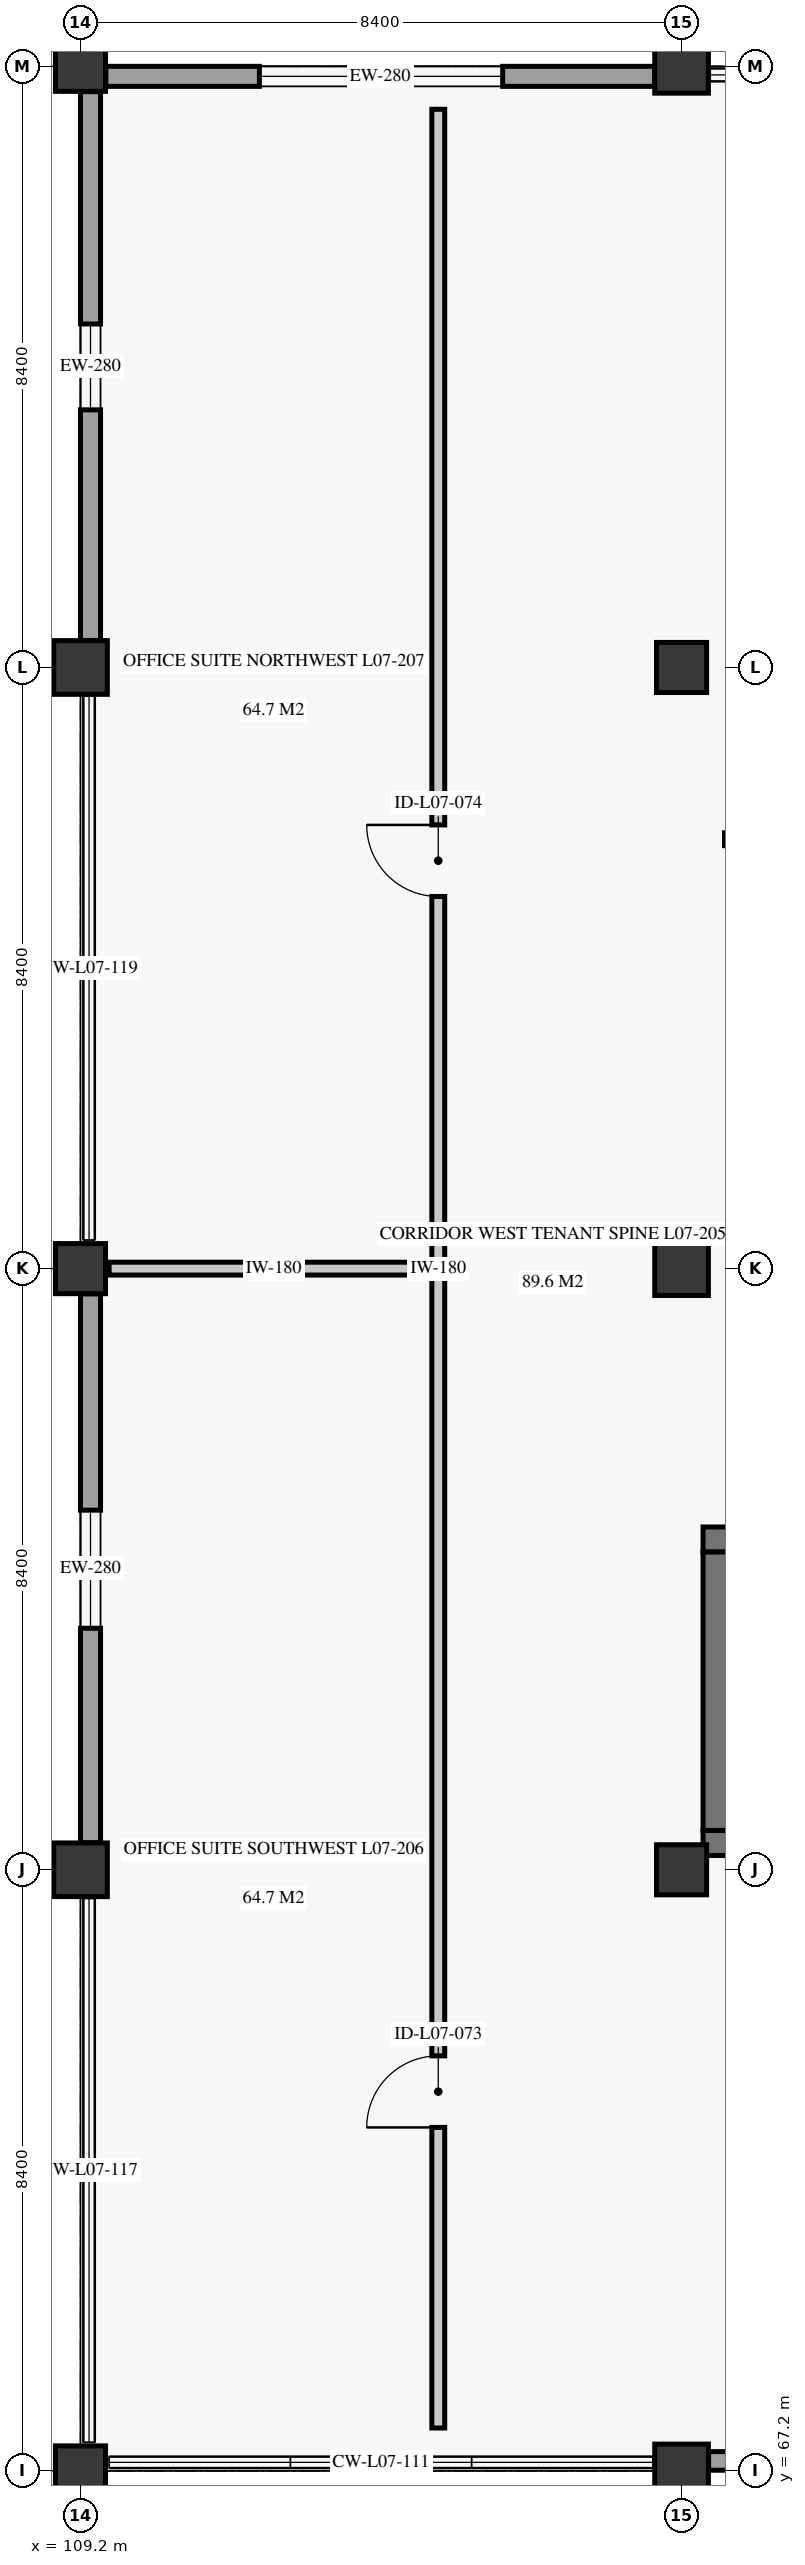
"""IFC4 building model, lengths in metres.
Left out: names, types, materials, properties, quantities, classifications, styles, units other than length and angle.
Written with IfcOpenShell. Run it as: python <this file> out.ifc"""

import sys

from ifc_helpers import new_model, si_unit, direction, frame, frame_2d, origin, origin_2d, place, context, subcontext, project, spatial, rectangle, extrude, element, fill, save


model = new_model("IFC4")
c1 = context("Model", 3, precision=1e-05, world=origin(), true_north=direction((0.0, 1.0)))
c2 = subcontext(c1, "Body", "Model", "MODEL_VIEW")
j1 = project(units=[si_unit("LENGTHUNIT", "METRE"), si_unit("PLANEANGLEUNIT", "RADIAN")], contexts=[c1])
p1 = place(None, origin())
s1 = spatial("IfcSite", under=j1, at=p1, CompositionType="ELEMENT")
p2 = place(p1, origin())
s2 = spatial("IfcBuilding", under=s1, at=p2, CompositionType="ELEMENT")
p3 = place(p2, frame((0.0, 0.0, 30.7)))
s3 = spatial("IfcBuildingStorey", under=s2, at=p3, CompositionType="ELEMENT", Elevation=30.7)
p4 = place(p3, frame((109.2, 67.2, 0.0), z_axis=(0.0, 0.0, 1.0), x_axis=(1.0, 0.0, 0.0)))
e1 = element("IfcColumn", 1, at=p4, inside=s3, PredefinedType="COLUMN", context=c2, shape_type="SweptSolid", body=[
    extrude(rectangle(XDim=0.7, YDim=0.7, at=origin_2d()), origin(), (0.0, 0.0, 1.0), 3.72),
])
p5 = place(p3, frame((109.2, 75.6, 0.0), z_axis=(0.0, 0.0, 1.0), x_axis=(1.0, 0.0, 0.0)))
e2 = element("IfcColumn", 2, at=p5, inside=s3, PredefinedType="COLUMN", context=c2, shape_type="SweptSolid", body=[
    extrude(rectangle(XDim=0.75, YDim=0.75, at=origin_2d()), origin(), (0.0, 0.0, 1.0), 3.72),
])
p6 = place(p3, frame((109.2, 84.0, 0.0), z_axis=(0.0, 0.0, 1.0), x_axis=(1.0, 0.0, 0.0)))
e3 = element("IfcColumn", 3, at=p6, inside=s3, PredefinedType="COLUMN", context=c2, shape_type="SweptSolid", body=[
    extrude(rectangle(XDim=0.7, YDim=0.7, at=origin_2d()), origin(), (0.0, 0.0, 1.0), 3.72),
])
p7 = place(p3, frame((109.2, 92.4, 0.0), z_axis=(0.0, 0.0, 1.0), x_axis=(1.0, 0.0, 0.0)))
e4 = element("IfcColumn", 4, at=p7, inside=s3, PredefinedType="COLUMN", context=c2, shape_type="SweptSolid", body=[
    extrude(rectangle(XDim=0.75, YDim=0.75, at=origin_2d()), origin(), (0.0, 0.0, 1.0), 3.72),
])
p8 = place(p3, frame((109.2, 100.8, 0.0), z_axis=(0.0, 0.0, 1.0), x_axis=(1.0, 0.0, 0.0)))
e5 = element("IfcColumn", 5, at=p8, inside=s3, PredefinedType="COLUMN", context=c2, shape_type="SweptSolid", body=[
    extrude(rectangle(XDim=0.7, YDim=0.7, at=origin_2d()), origin(), (0.0, 0.0, 1.0), 3.72),
])
p9 = place(p3, frame((117.6, 67.2, 0.0), z_axis=(0.0, 0.0, 1.0), x_axis=(1.0, 0.0, 0.0)))
e6 = element("IfcColumn", 6, at=p9, inside=s3, PredefinedType="COLUMN", context=c2, shape_type="SweptSolid", body=[
    extrude(rectangle(XDim=0.75, YDim=0.75, at=origin_2d()), origin(), (0.0, 0.0, 1.0), 3.72),
])
p10 = place(p3, frame((117.6, 75.6, 0.0), z_axis=(0.0, 0.0, 1.0), x_axis=(1.0, 0.0, 0.0)))
e7 = element("IfcColumn", 7, at=p10, inside=s3, PredefinedType="COLUMN", context=c2, shape_type="SweptSolid", body=[
    extrude(rectangle(XDim=0.7, YDim=0.7, at=origin_2d()), origin(), (0.0, 0.0, 1.0), 3.72),
])
p11 = place(p3, frame((117.6, 84.0, 0.0), z_axis=(0.0, 0.0, 1.0), x_axis=(1.0, 0.0, 0.0)))
e8 = element("IfcColumn", 8, at=p11, inside=s3, PredefinedType="COLUMN", context=c2, shape_type="SweptSolid", body=[
    extrude(rectangle(XDim=0.75, YDim=0.75, at=origin_2d()), origin(), (0.0, 0.0, 1.0), 3.72),
])
p12 = place(p3, frame((117.6, 92.4, 0.0), z_axis=(0.0, 0.0, 1.0), x_axis=(1.0, 0.0, 0.0)))
e9 = element("IfcColumn", 9, at=p12, inside=s3, PredefinedType="COLUMN", context=c2, shape_type="SweptSolid", body=[
    extrude(rectangle(XDim=0.7, YDim=0.7, at=origin_2d()), origin(), (0.0, 0.0, 1.0), 3.72),
])
p13 = place(p3, frame((117.6, 100.8, 0.0), z_axis=(0.0, 0.0, 1.0), x_axis=(1.0, 0.0, 0.0)))
e10 = element("IfcColumn", 10, at=p13, inside=s3, PredefinedType="COLUMN", context=c2, shape_type="SweptSolid", body=[
    extrude(rectangle(XDim=0.75, YDim=0.75, at=origin_2d()), origin(), (0.0, 0.0, 1.0), 3.72),
])
p14 = place(p3, frame((109.554, 100.66, 0.0), z_axis=(0.0, 0.0, 1.0), x_axis=(1.0, 0.0, 0.0)))
e11 = element("IfcWall", 11, at=p14, inside=s3, PredefinedType="SOLIDWALL", context=c2, shape_type="SweptSolid", body=[
    extrude(rectangle(XDim=7.668, YDim=0.28, at=frame_2d((3.834, 0.0))), origin(), (0.0, 0.0, 1.0), 3.04),
])
p15 = place(p14, frame((2.146, 0.0, 0.85)))
e12 = element("IfcOpeningElement", 12, at=p15, cuts=e11, PredefinedType="OPENING", context=c2, shape_type="SweptSolid", body=[
    extrude(rectangle(XDim=3.4, YDim=1.9, at=frame_2d((1.7, 0.95))), frame((0.0, 0.15, 0.0), z_axis=(0.0, -1.0, 0.0), x_axis=(1.0, 0.0, 0.0)), (0.0, 0.0, 1.0), 0.3),
])
p16 = place(p3, frame((117.978, 67.34, 0.0), z_axis=(0.0, 0.0, 1.0), x_axis=(1.0, 0.0, 0.0)))
e13 = element("IfcWall", 13, at=p16, inside=s3, PredefinedType="SOLIDWALL", context=c2, shape_type="SweptSolid", body=[
    extrude(rectangle(XDim=7.67, YDim=0.26, at=frame_2d((3.835, 0.0))), origin(), (0.0, 0.0, 1.0), 3.04),
])
p17 = place(p16, frame((1.972, 0.0, 0.85)))
e14 = element("IfcOpeningElement", 14, at=p17, cuts=e13, PredefinedType="OPENING", context=c2, shape_type="SweptSolid", body=[
    extrude(rectangle(XDim=3.7, YDim=1.9, at=frame_2d((1.85, 0.95))), frame((0.0, 0.14, 0.0), z_axis=(0.0, -1.0, 0.0), x_axis=(1.0, 0.0, 0.0)), (0.0, 0.0, 1.0), 0.28),
])
p18 = place(p3, frame((109.34, 75.978, 0.0), z_axis=(0.0, 0.0, 1.0), x_axis=(0.0, 1.0, 0.0)))
e15 = element("IfcWall", 15, at=p18, inside=s3, PredefinedType="SOLIDWALL", context=c2, shape_type="SweptSolid", body=[
    extrude(rectangle(XDim=7.67, YDim=0.28, at=frame_2d((3.835, 0.0))), origin(), (0.0, 0.0, 1.0), 3.04),
])
p19 = place(p18, frame((2.997, 0.0, 0.85)))
e16 = element("IfcOpeningElement", 16, at=p19, cuts=e15, PredefinedType="OPENING", context=c2, shape_type="SweptSolid", body=[
    extrude(rectangle(XDim=1.65, YDim=1.75, at=frame_2d((0.825, 0.875))), frame((0.0, 0.15, 0.0), z_axis=(0.0, -1.0, 0.0), x_axis=(1.0, 0.0, 0.0)), (0.0, 0.0, 1.0), 0.3),
])
p20 = place(p3, frame((109.34, 92.778, 0.0), z_axis=(0.0, 0.0, 1.0), x_axis=(0.0, 1.0, 0.0)))
e17 = element("IfcWall", 17, at=p20, inside=s3, PredefinedType="SOLIDWALL", context=c2, shape_type="SweptSolid", body=[
    extrude(rectangle(XDim=7.668, YDim=0.28, at=frame_2d((3.834, 0.0))), origin(), (0.0, 0.0, 1.0), 3.04),
])
p21 = place(p20, frame((3.222, 0.0, 0.85)))
e18 = element("IfcOpeningElement", 18, at=p21, cuts=e17, PredefinedType="OPENING", context=c2, shape_type="SweptSolid", body=[
    extrude(rectangle(XDim=1.2, YDim=1.6, at=frame_2d((0.6, 0.8))), frame((0.0, 0.15, 0.0), z_axis=(0.0, -1.0, 0.0), x_axis=(1.0, 0.0, 0.0)), (0.0, 0.0, 1.0), 0.3),
])
p22 = place(p3, frame((117.9, 75.975, 0.0), z_axis=(0.0, 0.0, 1.0), x_axis=(1.0, 0.0, 0.0)))
e19 = element("IfcWall", 19, at=p22, inside=s3, PredefinedType="SHEAR", context=c2, shape_type="SweptSolid", body=[
    extrude(rectangle(XDim=9.75, YDim=0.35, at=frame_2d((4.875, 0.0))), origin(), (0.0, 0.0, 1.0), 3.72),
])
p23 = place(p3, frame((117.9, 80.215, 0.0), z_axis=(0.0, 0.0, 1.0), x_axis=(1.0, 0.0, 0.0)))
e20 = element("IfcWall", 20, at=p23, inside=s3, PredefinedType="SHEAR", context=c2, shape_type="SweptSolid", body=[
    extrude(rectangle(XDim=9.75, YDim=0.35, at=frame_2d((4.875, 0.0))), origin(), (0.0, 0.0, 1.0), 3.72),
])
p24 = place(p23, frame((0.72, 0.0, 0.0)))
e21 = element("IfcOpeningElement", 21, at=p24, cuts=e20, PredefinedType="OPENING", context=c2, shape_type="SweptSolid", body=[
    extrude(rectangle(XDim=1.25, YDim=2.2, at=frame_2d((0.625, 1.1))), frame((0.0, 0.185, 0.0), z_axis=(0.0, -1.0, 0.0), x_axis=(1.0, 0.0, 0.0)), (0.0, 0.0, 1.0), 0.37),
])
p25 = place(p3, frame((118.075, 76.15, 0.0), z_axis=(0.0, 0.0, 1.0), x_axis=(0.0, 1.0, 0.0)))
e22 = element("IfcWall", 22, at=p25, inside=s3, PredefinedType="SHEAR", context=c2, shape_type="SweptSolid", body=[
    extrude(rectangle(XDim=3.89, YDim=0.35, at=frame_2d((1.945, 0.0))), origin(), (0.0, 0.0, 1.0), 3.72),
])
p26 = place(p3, frame((114.2, 67.8, 0.0), z_axis=(0.0, 0.0, 1.0), x_axis=(0.0, 1.0, 0.0)))
e23 = element("IfcWall", 23, at=p26, inside=s3, PredefinedType="PARTITIONING", context=c2, shape_type="SweptSolid", body=[
    extrude(rectangle(XDim=32.4, YDim=0.18, at=frame_2d((16.2, 0.0))), origin(), (0.0, 0.0, 1.0), 3.34),
])
p27 = place(p26, frame((4.2, 0.0, 0.0)))
e24 = element("IfcOpeningElement", 24, at=p27, cuts=e23, PredefinedType="OPENING", context=c2, shape_type="SweptSolid", body=[
    extrude(rectangle(XDim=1.0, YDim=2.15, at=frame_2d((0.5, 1.075))), frame((0.0, 0.1, 0.0), z_axis=(0.0, -1.0, 0.0), x_axis=(1.0, 0.0, 0.0)), (0.0, 0.0, 1.0), 0.2),
])
p28 = place(p26, frame((21.4, 0.0, 0.0)))
e25 = element("IfcOpeningElement", 25, at=p28, cuts=e23, PredefinedType="OPENING", context=c2, shape_type="SweptSolid", body=[
    extrude(rectangle(XDim=1.0, YDim=2.15, at=frame_2d((0.5, 1.075))), frame((0.0, 0.1, 0.0), z_axis=(0.0, -1.0, 0.0), x_axis=(1.0, 0.0, 0.0)), (0.0, 0.0, 1.0), 0.2),
])
p29 = place(p3, frame((109.6, 84.0, 0.0), z_axis=(0.0, 0.0, 1.0), x_axis=(1.0, 0.0, 0.0)))
e26 = element("IfcWall", 26, at=p29, inside=s3, PredefinedType="PARTITIONING", context=c2, shape_type="SweptSolid", body=[
    extrude(rectangle(XDim=4.6, YDim=0.18, at=frame_2d((2.3, 0.0))), origin(), (0.0, 0.0, 1.0), 3.34),
])
p30 = place(p15, origin())
e27 = element("IfcWindow", 27, at=p30, inside=s3, PartitioningType="SINGLE_PANEL", PredefinedType="WINDOW", context=c2, shape_type="SweptSolid", body=[
    extrude(rectangle(XDim=3.4, YDim=1.9, at=frame_2d((1.7, 0.95))), frame((0.0, 0.03, 0.0), z_axis=(0.0, -1.0, 0.0), x_axis=(1.0, 0.0, 0.0)), (0.0, 0.0, 1.0), 0.06),
])
fill(e12, e27)
p31 = place(p19, origin())
e28 = element("IfcWindow", 28, at=p31, inside=s3, PartitioningType="SINGLE_PANEL", PredefinedType="WINDOW", context=c2, shape_type="SweptSolid", body=[
    extrude(rectangle(XDim=1.65, YDim=1.75, at=frame_2d((0.825, 0.875))), frame((0.0, 0.03, 0.0), z_axis=(0.0, -1.0, 0.0), x_axis=(1.0, 0.0, 0.0)), (0.0, 0.0, 1.0), 0.06),
])
fill(e16, e28)
p32 = place(p21, origin())
e29 = element("IfcWindow", 29, at=p32, inside=s3, PartitioningType="SINGLE_PANEL", PredefinedType="WINDOW", context=c2, shape_type="SweptSolid", body=[
    extrude(rectangle(XDim=1.2, YDim=1.6, at=frame_2d((0.6, 0.8))), frame((0.0, 0.03, 0.0), z_axis=(0.0, -1.0, 0.0), x_axis=(1.0, 0.0, 0.0)), (0.0, 0.0, 1.0), 0.06),
])
fill(e18, e29)
p33 = place(p27, origin())
e30 = element("IfcDoor", 30, at=p33, inside=s3, OperationType="SINGLE_SWING_LEFT", PredefinedType="DOOR", context=c2, shape_type="SweptSolid", body=[
    extrude(rectangle(XDim=1.0, YDim=2.15, at=frame_2d((0.5, 1.075))), frame((0.0, 0.025, 0.0), z_axis=(0.0, -1.0, 0.0), x_axis=(1.0, 0.0, 0.0)), (0.0, 0.0, 1.0), 0.05),
])
fill(e24, e30)
p34 = place(p28, origin())
e31 = element("IfcDoor", 31, at=p34, inside=s3, OperationType="SINGLE_SWING_RIGHT", PredefinedType="DOOR", context=c2, shape_type="SweptSolid", body=[
    extrude(rectangle(XDim=1.0, YDim=2.15, at=frame_2d((0.5, 1.075))), frame((0.0, 0.025, 0.0), z_axis=(0.0, -1.0, 0.0), x_axis=(1.0, 0.0, 0.0)), (0.0, 0.0, 1.0), 0.05),
])
fill(e25, e31)
save(model, sys.argv[1])
